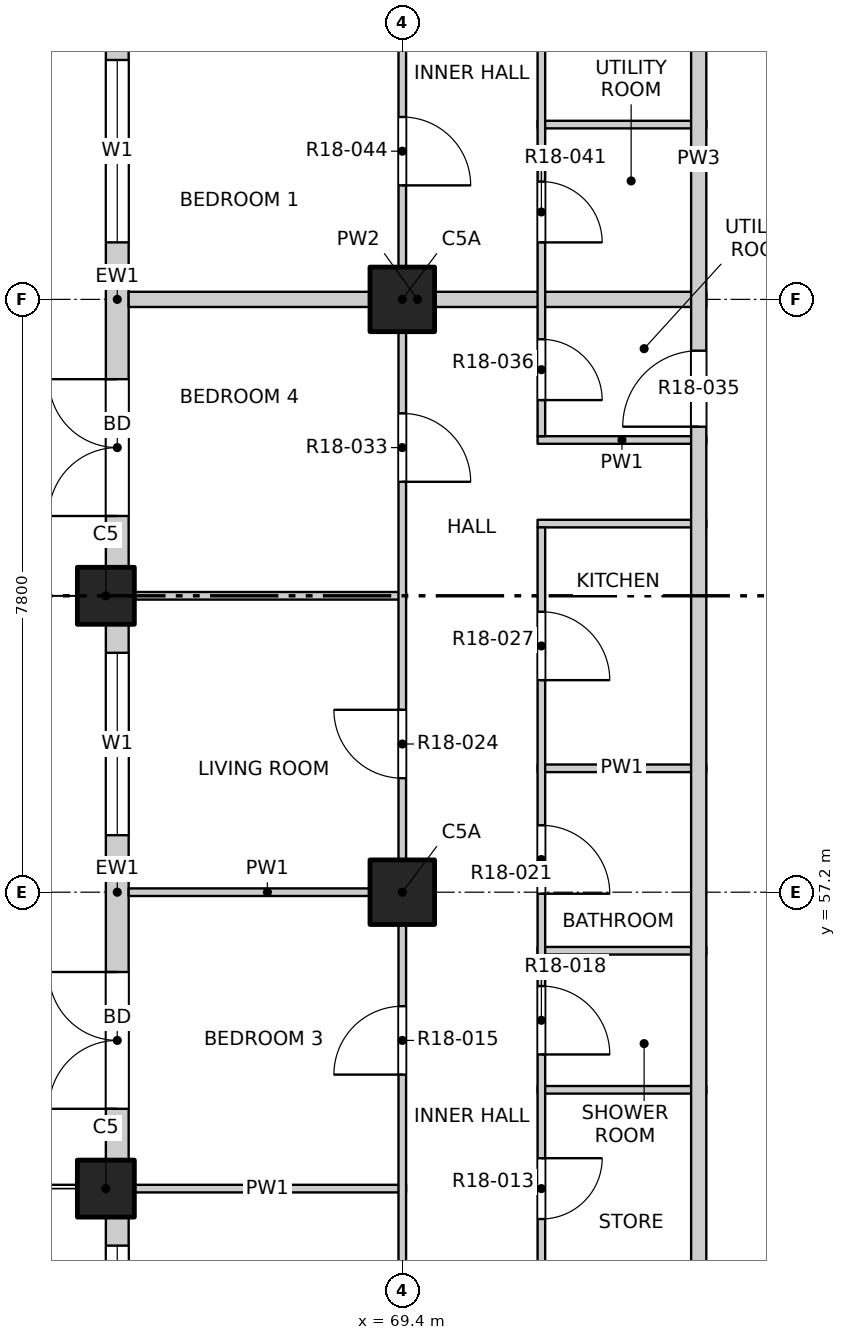
"""IFC4 building model, lengths in metres.
Left out: names, types, materials, properties, quantities, classifications, styles, units other than length and angle.
Written with IfcOpenShell. Run it as: python <this file> out.ifc"""

import sys

from ifc_helpers import new_model, si_unit, direction, frame, frame_2d, origin, origin_2d, place, context, subcontext, project, spatial, rectangle, extrude, element, fill, save


model = new_model("IFC4")
c1 = context("Model", 3, precision=1e-05, world=origin(), true_north=direction((0.0, 1.0)))
c2 = subcontext(c1, "Body", "Model", "MODEL_VIEW")
j1 = project(units=[si_unit("LENGTHUNIT", "METRE"), si_unit("PLANEANGLEUNIT", "RADIAN")], contexts=[c1])
p1 = place(None, origin())
s1 = spatial("IfcSite", under=j1, at=p1, CompositionType="ELEMENT")
p2 = place(p1, origin())
s2 = spatial("IfcBuilding", under=s1, at=p2, CompositionType="ELEMENT")
p3 = place(p2, frame((0.0, 0.0, 189.4)))
s3 = spatial("IfcBuildingStorey", under=s2, at=p3, CompositionType="ELEMENT", Elevation=189.4)
for number, where, z_axis, x_axis in (
    (1, (65.5, 53.3, -0.25), (0.0, 0.0, 1.0), (1.0, 0.0, 0.0)),
    (2, (65.5, 61.1, -0.25), (0.0, 0.0, 1.0), (1.0, 0.0, 0.0)),
):
    element("IfcColumn", number, at=place(p3, frame(where, z_axis=z_axis, x_axis=x_axis)), inside=s3, PredefinedType="COLUMN", context=c2, shape_type="SweptSolid", body=[
        extrude(rectangle(XDim=0.75, YDim=0.75, at=origin_2d()), origin(), (0.0, 0.0, 1.0), 3.35),
    ])
for number, where, z_axis, x_axis in (
    (3, (69.4, 57.2, -0.25), (0.0, 0.0, 1.0), (1.0, 0.0, 0.0)),
    (4, (69.4, 65.0, -0.25), (0.0, 0.0, 1.0), (1.0, 0.0, 0.0)),
):
    element("IfcColumn", number, at=place(p3, frame(where, z_axis=z_axis, x_axis=x_axis)), inside=s3, PredefinedType="COLUMN", context=c2, shape_type="SweptSolid", body=[
        extrude(rectangle(XDim=0.85, YDim=0.85, at=origin_2d()), origin(), (0.0, 0.0, 1.0), 3.35),
    ])
p4 = place(p3, frame((65.65, 49.4, 0.0), z_axis=(0.0, 0.0, 1.0), x_axis=(0.0, 1.0, 0.0)))
e5 = element("IfcWall", 5, at=p4, inside=s3, PredefinedType="SOLIDWALL", context=c2, shape_type="SweptSolid", body=[
    extrude(rectangle(XDim=3.525, YDim=0.3, at=frame_2d((1.763, 0.0))), origin(), (0.0, 0.0, 1.0), 3.1),
])
p5 = place(p4, frame((0.75, 0.0, 0.9)))
e6 = element("IfcOpeningElement", 6, at=p5, cuts=e5, PredefinedType="OPENING", context=c2, shape_type="SweptSolid", body=[
    extrude(rectangle(XDim=2.4, YDim=1.8, at=frame_2d((1.2, 0.9))), frame((0.0, 0.16, 0.0), z_axis=(0.0, -1.0, 0.0), x_axis=(1.0, 0.0, 0.0)), (0.0, 0.0, 1.0), 0.32),
])
p6 = place(p3, frame((65.65, 53.675, 0.0), z_axis=(0.0, 0.0, 1.0), x_axis=(0.0, 1.0, 0.0)))
e7 = element("IfcWall", 7, at=p6, inside=s3, PredefinedType="SOLIDWALL", context=c2, shape_type="SweptSolid", body=[
    extrude(rectangle(XDim=7.05, YDim=0.3, at=frame_2d((3.525, 0.0))), origin(), (0.0, 0.0, 1.0), 3.1),
])
p7 = place(p6, frame((0.675, 0.0, 0.0)))
e8 = element("IfcOpeningElement", 8, at=p7, cuts=e7, PredefinedType="OPENING", context=c2, shape_type="SweptSolid", body=[
    extrude(rectangle(XDim=1.8, YDim=2.4, at=frame_2d((0.9, 1.2))), frame((0.0, 0.16, 0.0), z_axis=(0.0, -1.0, 0.0), x_axis=(1.0, 0.0, 0.0)), (0.0, 0.0, 1.0), 0.32),
])
p8 = place(p6, frame((4.275, 0.0, 0.9)))
e9 = element("IfcOpeningElement", 9, at=p8, cuts=e7, PredefinedType="OPENING", context=c2, shape_type="SweptSolid", body=[
    extrude(rectangle(XDim=2.4, YDim=1.8, at=frame_2d((1.2, 0.9))), frame((0.0, 0.16, 0.0), z_axis=(0.0, -1.0, 0.0), x_axis=(1.0, 0.0, 0.0)), (0.0, 0.0, 1.0), 0.32),
])
p9 = place(p3, frame((65.65, 61.475, 0.0), z_axis=(0.0, 0.0, 1.0), x_axis=(0.0, 1.0, 0.0)))
e10 = element("IfcWall", 10, at=p9, inside=s3, PredefinedType="SOLIDWALL", context=c2, shape_type="SweptSolid", body=[
    extrude(rectangle(XDim=7.05, YDim=0.3, at=frame_2d((3.525, 0.0))), origin(), (0.0, 0.0, 1.0), 3.1),
])
p10 = place(p9, frame((0.675, 0.0, 0.0)))
e11 = element("IfcOpeningElement", 11, at=p10, cuts=e10, PredefinedType="OPENING", context=c2, shape_type="SweptSolid", body=[
    extrude(rectangle(XDim=1.8, YDim=2.4, at=frame_2d((0.9, 1.2))), frame((0.0, 0.16, 0.0), z_axis=(0.0, -1.0, 0.0), x_axis=(1.0, 0.0, 0.0)), (0.0, 0.0, 1.0), 0.32),
])
p11 = place(p9, frame((4.275, 0.0, 0.9)))
e12 = element("IfcOpeningElement", 12, at=p11, cuts=e10, PredefinedType="OPENING", context=c2, shape_type="SweptSolid", body=[
    extrude(rectangle(XDim=2.4, YDim=1.8, at=frame_2d((1.2, 0.9))), frame((0.0, 0.16, 0.0), z_axis=(0.0, -1.0, 0.0), x_axis=(1.0, 0.0, 0.0)), (0.0, 0.0, 1.0), 0.32),
])
p12 = place(p3, frame((65.8, 53.3, 0.0), z_axis=(0.0, 0.0, 1.0), x_axis=(1.0, 0.0, 0.0)))
e13 = element("IfcWall", 13, at=p12, inside=s3, PredefinedType="PARTITIONING", context=c2, shape_type="SweptSolid", body=[
    extrude(rectangle(XDim=3.65, YDim=0.1, at=frame_2d((1.825, 0.0))), origin(), (0.0, 0.0, 1.0), 3.1),
])
for number, where, z_axis, x_axis in (
    (14, (71.18, 54.6, 0.0), (0.0, 0.0, 1.0), (1.0, 0.0, 0.0)),
    (15, (71.18, 56.43, 0.0), (0.0, 0.0, 1.0), (1.0, 0.0, 0.0)),
):
    element("IfcWall", number, at=place(p3, frame(where, z_axis=z_axis, x_axis=x_axis)), inside=s3, PredefinedType="PARTITIONING", context=c2, shape_type="SweptSolid", body=[
        extrude(rectangle(XDim=2.22, YDim=0.1, at=frame_2d((1.11, 0.0))), origin(), (0.0, 0.0, 1.0), 3.1),
    ])
p13 = place(p3, frame((65.8, 57.2, 0.0), z_axis=(0.0, 0.0, 1.0), x_axis=(1.0, 0.0, 0.0)))
e16 = element("IfcWall", 16, at=p13, inside=s3, PredefinedType="PARTITIONING", context=c2, shape_type="SweptSolid", body=[
    extrude(rectangle(XDim=3.65, YDim=0.1, at=frame_2d((1.825, 0.0))), origin(), (0.0, 0.0, 1.0), 3.1),
])
p14 = place(p3, frame((71.18, 58.83, 0.0), z_axis=(0.0, 0.0, 1.0), x_axis=(1.0, 0.0, 0.0)))
e17 = element("IfcWall", 17, at=p14, inside=s3, PredefinedType="PARTITIONING", context=c2, shape_type="SweptSolid", body=[
    extrude(rectangle(XDim=2.22, YDim=0.1, at=frame_2d((1.11, 0.0))), origin(), (0.0, 0.0, 1.0), 3.1),
])
p15 = place(p3, frame((65.8, 61.1, 0.0), z_axis=(0.0, 0.0, 1.0), x_axis=(1.0, 0.0, 0.0)))
e18 = element("IfcWall", 18, at=p15, inside=s3, PredefinedType="PARTITIONING", context=c2, shape_type="SweptSolid", body=[
    extrude(rectangle(XDim=3.65, YDim=0.1, at=frame_2d((1.825, 0.0))), origin(), (0.0, 0.0, 1.0), 3.1),
])
for number, where, z_axis, x_axis in (
    (19, (71.18, 62.05, 0.0), (0.0, 0.0, 1.0), (1.0, 0.0, 0.0)),
    (20, (71.18, 63.15, 0.0), (0.0, 0.0, 1.0), (1.0, 0.0, 0.0)),
):
    element("IfcWall", number, at=place(p3, frame(where, z_axis=z_axis, x_axis=x_axis)), inside=s3, PredefinedType="PARTITIONING", context=c2, shape_type="SweptSolid", body=[
        extrude(rectangle(XDim=2.22, YDim=0.1, at=frame_2d((1.11, 0.0))), origin(), (0.0, 0.0, 1.0), 3.1),
    ])
p16 = place(p3, frame((65.8, 65.0, 0.0), z_axis=(0.0, 0.0, 1.0), x_axis=(1.0, 0.0, 0.0)))
e21 = element("IfcWall", 21, at=p16, inside=s3, PredefinedType="PARTITIONING", context=c2, shape_type="SweptSolid", body=[
    extrude(rectangle(XDim=7.6, YDim=0.2, at=frame_2d((3.8, 0.0))), origin(), (0.0, 0.0, 1.0), 3.1),
])
p17 = place(p3, frame((71.18, 67.3, 0.0), z_axis=(0.0, 0.0, 1.0), x_axis=(1.0, 0.0, 0.0)))
e22 = element("IfcWall", 22, at=p17, inside=s3, PredefinedType="PARTITIONING", context=c2, shape_type="SweptSolid", body=[
    extrude(rectangle(XDim=2.22, YDim=0.1, at=frame_2d((1.11, 0.0))), origin(), (0.0, 0.0, 1.0), 3.1),
])
p18 = place(p3, frame((69.4, 45.8, 0.0), z_axis=(0.0, 0.0, 1.0), x_axis=(0.0, 1.0, 0.0)))
e23 = element("IfcWall", 23, at=p18, inside=s3, PredefinedType="PARTITIONING", context=c2, shape_type="SweptSolid", body=[
    extrude(rectangle(XDim=38.4, YDim=0.1, at=frame_2d((19.2, 0.0))), origin(), (0.0, 0.0, 1.0), 3.1),
])
p19 = place(p18, frame((1.05, 0.0, 0.0)))
e24 = element("IfcOpeningElement", 24, at=p19, cuts=e23, PredefinedType="OPENING", context=c2, shape_type="SweptSolid", body=[
    extrude(rectangle(XDim=1.2, YDim=2.1, at=frame_2d((0.6, 1.05))), frame((0.0, 0.06, 0.0), z_axis=(0.0, -1.0, 0.0), x_axis=(1.0, 0.0, 0.0)), (0.0, 0.0, 1.0), 0.12),
])
p20 = place(p18, frame((5.1, 0.0, 0.0)))
e25 = element("IfcOpeningElement", 25, at=p20, cuts=e23, PredefinedType="OPENING", context=c2, shape_type="SweptSolid", body=[
    extrude(rectangle(XDim=0.9, YDim=2.1, at=frame_2d((0.45, 1.05))), frame((0.0, 0.06, 0.0), z_axis=(0.0, -1.0, 0.0), x_axis=(1.0, 0.0, 0.0)), (0.0, 0.0, 1.0), 0.12),
])
p21 = place(p18, frame((9.0, 0.0, 0.0)))
e26 = element("IfcOpeningElement", 26, at=p21, cuts=e23, PredefinedType="OPENING", context=c2, shape_type="SweptSolid", body=[
    extrude(rectangle(XDim=0.9, YDim=2.1, at=frame_2d((0.45, 1.05))), frame((0.0, 0.06, 0.0), z_axis=(0.0, -1.0, 0.0), x_axis=(1.0, 0.0, 0.0)), (0.0, 0.0, 1.0), 0.12),
])
p22 = place(p18, frame((12.9, 0.0, 0.0)))
e27 = element("IfcOpeningElement", 27, at=p22, cuts=e23, PredefinedType="OPENING", context=c2, shape_type="SweptSolid", body=[
    extrude(rectangle(XDim=0.9, YDim=2.1, at=frame_2d((0.45, 1.05))), frame((0.0, 0.06, 0.0), z_axis=(0.0, -1.0, 0.0), x_axis=(1.0, 0.0, 0.0)), (0.0, 0.0, 1.0), 0.12),
])
p23 = place(p18, frame((16.8, 0.0, 0.0)))
e28 = element("IfcOpeningElement", 28, at=p23, cuts=e23, PredefinedType="OPENING", context=c2, shape_type="SweptSolid", body=[
    extrude(rectangle(XDim=0.9, YDim=2.1, at=frame_2d((0.45, 1.05))), frame((0.0, 0.06, 0.0), z_axis=(0.0, -1.0, 0.0), x_axis=(1.0, 0.0, 0.0)), (0.0, 0.0, 1.0), 0.12),
])
p24 = place(p18, frame((20.7, 0.0, 0.0)))
e29 = element("IfcOpeningElement", 29, at=p24, cuts=e23, PredefinedType="OPENING", context=c2, shape_type="SweptSolid", body=[
    extrude(rectangle(XDim=0.9, YDim=2.1, at=frame_2d((0.45, 1.05))), frame((0.0, 0.06, 0.0), z_axis=(0.0, -1.0, 0.0), x_axis=(1.0, 0.0, 0.0)), (0.0, 0.0, 1.0), 0.12),
])
p25 = place(p18, frame((24.6, 0.0, 0.0)))
e30 = element("IfcOpeningElement", 30, at=p25, cuts=e23, PredefinedType="OPENING", context=c2, shape_type="SweptSolid", body=[
    extrude(rectangle(XDim=0.9, YDim=2.1, at=frame_2d((0.45, 1.05))), frame((0.0, 0.06, 0.0), z_axis=(0.0, -1.0, 0.0), x_axis=(1.0, 0.0, 0.0)), (0.0, 0.0, 1.0), 0.12),
])
p26 = place(p18, frame((28.5, 0.0, 0.0)))
e31 = element("IfcOpeningElement", 31, at=p26, cuts=e23, PredefinedType="OPENING", context=c2, shape_type="SweptSolid", body=[
    extrude(rectangle(XDim=0.9, YDim=2.1, at=frame_2d((0.45, 1.05))), frame((0.0, 0.06, 0.0), z_axis=(0.0, -1.0, 0.0), x_axis=(1.0, 0.0, 0.0)), (0.0, 0.0, 1.0), 0.12),
])
p27 = place(p18, frame((32.4, 0.0, 0.0)))
e32 = element("IfcOpeningElement", 32, at=p27, cuts=e23, PredefinedType="OPENING", context=c2, shape_type="SweptSolid", body=[
    extrude(rectangle(XDim=0.9, YDim=2.1, at=frame_2d((0.45, 1.05))), frame((0.0, 0.06, 0.0), z_axis=(0.0, -1.0, 0.0), x_axis=(1.0, 0.0, 0.0)), (0.0, 0.0, 1.0), 0.12),
])
p28 = place(p18, frame((36.15, 0.0, 0.0)))
e33 = element("IfcOpeningElement", 33, at=p28, cuts=e23, PredefinedType="OPENING", context=c2, shape_type="SweptSolid", body=[
    extrude(rectangle(XDim=1.2, YDim=2.1, at=frame_2d((0.6, 1.05))), frame((0.0, 0.06, 0.0), z_axis=(0.0, -1.0, 0.0), x_axis=(1.0, 0.0, 0.0)), (0.0, 0.0, 1.0), 0.12),
])
p29 = place(p3, frame((71.23, 49.45, 0.0), z_axis=(0.0, 0.0, 1.0), x_axis=(0.0, 1.0, 0.0)))
e34 = element("IfcWall", 34, at=p29, inside=s3, PredefinedType="PARTITIONING", context=c2, shape_type="SweptSolid", body=[
    extrude(rectangle(XDim=12.55, YDim=0.1, at=frame_2d((6.275, 0.0))), origin(), (0.0, 0.0, 1.0), 3.1),
])
p30 = place(p29, frame((0.85, 0.0, 0.0)))
e35 = element("IfcOpeningElement", 35, at=p30, cuts=e34, PredefinedType="OPENING", context=c2, shape_type="SweptSolid", body=[
    extrude(rectangle(XDim=0.8, YDim=2.1, at=frame_2d((0.4, 1.05))), frame((0.0, 0.06, 0.0), z_axis=(0.0, -1.0, 0.0), x_axis=(1.0, 0.0, 0.0)), (0.0, 0.0, 1.0), 0.12),
])
p31 = place(p29, frame((3.45, 0.0, 0.0)))
e36 = element("IfcOpeningElement", 36, at=p31, cuts=e34, PredefinedType="OPENING", context=c2, shape_type="SweptSolid", body=[
    extrude(rectangle(XDim=0.8, YDim=2.1, at=frame_2d((0.4, 1.05))), frame((0.0, 0.06, 0.0), z_axis=(0.0, -1.0, 0.0), x_axis=(1.0, 0.0, 0.0)), (0.0, 0.0, 1.0), 0.12),
])
p32 = place(p29, frame((5.615, 0.0, 0.0)))
e37 = element("IfcOpeningElement", 37, at=p32, cuts=e34, PredefinedType="OPENING", context=c2, shape_type="SweptSolid", body=[
    extrude(rectangle(XDim=0.9, YDim=2.1, at=frame_2d((0.45, 1.05))), frame((0.0, 0.06, 0.0), z_axis=(0.0, -1.0, 0.0), x_axis=(1.0, 0.0, 0.0)), (0.0, 0.0, 1.0), 0.12),
])
p33 = place(p29, frame((7.73, 0.0, 0.0)))
e38 = element("IfcOpeningElement", 38, at=p33, cuts=e34, PredefinedType="OPENING", context=c2, shape_type="SweptSolid", body=[
    extrude(rectangle(XDim=0.9, YDim=2.1, at=frame_2d((0.45, 1.05))), frame((0.0, 0.06, 0.0), z_axis=(0.0, -1.0, 0.0), x_axis=(1.0, 0.0, 0.0)), (0.0, 0.0, 1.0), 0.12),
])
p34 = place(p29, frame((10.54, 0.0, 0.0)))
e39 = element("IfcOpeningElement", 39, at=p34, cuts=e34, PredefinedType="OPENING", context=c2, shape_type="SweptSolid", body=[
    extrude(rectangle(XDim=0.9, YDim=2.1, at=frame_2d((0.45, 1.05))), frame((0.0, 0.06, 0.0), z_axis=(0.0, -1.0, 0.0), x_axis=(1.0, 0.0, 0.0)), (0.0, 0.0, 1.0), 0.12),
])
p35 = place(p3, frame((71.23, 63.2, 0.0), z_axis=(0.0, 0.0, 1.0), x_axis=(0.0, 1.0, 0.0)))
e40 = element("IfcWall", 40, at=p35, inside=s3, PredefinedType="PARTITIONING", context=c2, shape_type="SweptSolid", body=[
    extrude(rectangle(XDim=6.95, YDim=0.1, at=frame_2d((3.475, 0.0))), origin(), (0.0, 0.0, 1.0), 3.1),
])
p36 = place(p35, frame((0.475, 0.0, 0.0)))
e41 = element("IfcOpeningElement", 41, at=p36, cuts=e40, PredefinedType="OPENING", context=c2, shape_type="SweptSolid", body=[
    extrude(rectangle(XDim=0.8, YDim=2.1, at=frame_2d((0.4, 1.05))), frame((0.0, 0.06, 0.0), z_axis=(0.0, -1.0, 0.0), x_axis=(1.0, 0.0, 0.0)), (0.0, 0.0, 1.0), 0.12),
])
p37 = place(p35, frame((2.55, 0.0, 0.0)))
e42 = element("IfcOpeningElement", 42, at=p37, cuts=e40, PredefinedType="OPENING", context=c2, shape_type="SweptSolid", body=[
    extrude(rectangle(XDim=0.8, YDim=2.1, at=frame_2d((0.4, 1.05))), frame((0.0, 0.06, 0.0), z_axis=(0.0, -1.0, 0.0), x_axis=(1.0, 0.0, 0.0)), (0.0, 0.0, 1.0), 0.12),
])
p38 = place(p35, frame((5.15, 0.0, 0.0)))
e43 = element("IfcOpeningElement", 43, at=p38, cuts=e40, PredefinedType="OPENING", context=c2, shape_type="SweptSolid", body=[
    extrude(rectangle(XDim=0.8, YDim=2.1, at=frame_2d((0.4, 1.05))), frame((0.0, 0.06, 0.0), z_axis=(0.0, -1.0, 0.0), x_axis=(1.0, 0.0, 0.0)), (0.0, 0.0, 1.0), 0.12),
])
p39 = place(p3, frame((73.3, 49.5, 0.0), z_axis=(0.0, 0.0, 1.0), x_axis=(0.0, 1.0, 0.0)))
e44 = element("IfcWall", 44, at=p39, inside=s3, PredefinedType="PARTITIONING", context=c2, shape_type="SweptSolid", body=[
    extrude(rectangle(XDim=34.7, YDim=0.2, at=frame_2d((17.35, 0.0))), origin(), (0.0, 0.0, 1.0), 3.1),
])
p40 = place(p39, frame((13.825, 0.0, 0.0)))
e45 = element("IfcOpeningElement", 45, at=p40, cuts=e44, PredefinedType="OPENING", context=c2, shape_type="SweptSolid", body=[
    extrude(rectangle(XDim=1.0, YDim=2.1, at=frame_2d((0.5, 1.05))), frame((0.0, 0.11, 0.0), z_axis=(0.0, -1.0, 0.0), x_axis=(1.0, 0.0, 0.0)), (0.0, 0.0, 1.0), 0.22),
])
p41 = place(p39, frame((21.975, 0.0, 0.0)))
e46 = element("IfcOpeningElement", 46, at=p41, cuts=e44, PredefinedType="OPENING", context=c2, shape_type="SweptSolid", body=[
    extrude(rectangle(XDim=1.0, YDim=2.1, at=frame_2d((0.5, 1.05))), frame((0.0, 0.11, 0.0), z_axis=(0.0, -1.0, 0.0), x_axis=(1.0, 0.0, 0.0)), (0.0, 0.0, 1.0), 0.22),
])
p42 = place(p5, origin())
e47 = element("IfcWindow", 47, at=p42, inside=s3, PartitioningType="DOUBLE_PANEL_VERTICAL", PredefinedType="WINDOW", context=c2, shape_type="SweptSolid", body=[
    extrude(rectangle(XDim=2.4, YDim=1.8, at=frame_2d((1.2, 0.9))), frame((0.0, 0.03, 0.0), z_axis=(0.0, -1.0, 0.0), x_axis=(1.0, 0.0, 0.0)), (0.0, 0.0, 1.0), 0.06),
])
fill(e6, e47)
p43 = place(p7, origin())
e48 = element("IfcDoor", 48, at=p43, inside=s3, OperationType="DOUBLE_DOOR_SINGLE_SWING", PredefinedType="DOOR", context=c2, shape_type="SweptSolid", body=[
    extrude(rectangle(XDim=1.8, YDim=2.4, at=frame_2d((0.9, 1.2))), frame((0.0, 0.025, 0.0), z_axis=(0.0, -1.0, 0.0), x_axis=(1.0, 0.0, 0.0)), (0.0, 0.0, 1.0), 0.05),
])
fill(e8, e48)
p44 = place(p8, origin())
e49 = element("IfcWindow", 49, at=p44, inside=s3, PartitioningType="DOUBLE_PANEL_VERTICAL", PredefinedType="WINDOW", context=c2, shape_type="SweptSolid", body=[
    extrude(rectangle(XDim=2.4, YDim=1.8, at=frame_2d((1.2, 0.9))), frame((0.0, 0.03, 0.0), z_axis=(0.0, -1.0, 0.0), x_axis=(1.0, 0.0, 0.0)), (0.0, 0.0, 1.0), 0.06),
])
fill(e9, e49)
p45 = place(p10, origin())
e50 = element("IfcDoor", 50, at=p45, inside=s3, OperationType="DOUBLE_DOOR_SINGLE_SWING", PredefinedType="DOOR", context=c2, shape_type="SweptSolid", body=[
    extrude(rectangle(XDim=1.8, YDim=2.4, at=frame_2d((0.9, 1.2))), frame((0.0, 0.025, 0.0), z_axis=(0.0, -1.0, 0.0), x_axis=(1.0, 0.0, 0.0)), (0.0, 0.0, 1.0), 0.05),
])
fill(e11, e50)
p46 = place(p11, origin())
e51 = element("IfcWindow", 51, at=p46, inside=s3, PartitioningType="DOUBLE_PANEL_VERTICAL", PredefinedType="WINDOW", context=c2, shape_type="SweptSolid", body=[
    extrude(rectangle(XDim=2.4, YDim=1.8, at=frame_2d((1.2, 0.9))), frame((0.0, 0.03, 0.0), z_axis=(0.0, -1.0, 0.0), x_axis=(1.0, 0.0, 0.0)), (0.0, 0.0, 1.0), 0.06),
])
fill(e12, e51)
p47 = place(p31, origin())
e52 = element("IfcDoor", 52, at=p47, inside=s3, OperationType="SINGLE_SWING_LEFT", PredefinedType="DOOR", context=c2, shape_type="SweptSolid", body=[
    extrude(rectangle(XDim=0.8, YDim=2.1, at=frame_2d((0.4, 1.05))), frame((0.0, 0.025, 0.0), z_axis=(0.0, -1.0, 0.0), x_axis=(1.0, 0.0, 0.0)), (0.0, 0.0, 1.0), 0.05),
])
fill(e36, e52)
p48 = place(p21, origin())
e53 = element("IfcDoor", 53, at=p48, inside=s3, OperationType="SINGLE_SWING_LEFT", PredefinedType="DOOR", context=c2, shape_type="SweptSolid", body=[
    extrude(rectangle(XDim=0.9, YDim=2.1, at=frame_2d((0.45, 1.05))), frame((0.0, 0.025, 0.0), z_axis=(0.0, -1.0, 0.0), x_axis=(1.0, 0.0, 0.0)), (0.0, 0.0, 1.0), 0.05),
])
fill(e26, e53)
p49 = place(p32, origin())
e54 = element("IfcDoor", 54, at=p49, inside=s3, OperationType="SINGLE_SWING_RIGHT", PredefinedType="DOOR", context=c2, shape_type="SweptSolid", body=[
    extrude(rectangle(XDim=0.9, YDim=2.1, at=frame_2d((0.45, 1.05))), frame((0.0, 0.025, 0.0), z_axis=(0.0, -1.0, 0.0), x_axis=(1.0, 0.0, 0.0)), (0.0, 0.0, 1.0), 0.05),
])
fill(e37, e54)
p50 = place(p33, origin())
e55 = element("IfcDoor", 55, at=p50, inside=s3, OperationType="SINGLE_SWING_RIGHT", PredefinedType="DOOR", context=c2, shape_type="SweptSolid", body=[
    extrude(rectangle(XDim=0.9, YDim=2.1, at=frame_2d((0.45, 1.05))), frame((0.0, 0.025, 0.0), z_axis=(0.0, -1.0, 0.0), x_axis=(1.0, 0.0, 0.0)), (0.0, 0.0, 1.0), 0.05),
])
fill(e38, e55)
p51 = place(p22, origin())
e56 = element("IfcDoor", 56, at=p51, inside=s3, OperationType="SINGLE_SWING_RIGHT", PredefinedType="DOOR", context=c2, shape_type="SweptSolid", body=[
    extrude(rectangle(XDim=0.9, YDim=2.1, at=frame_2d((0.45, 1.05))), frame((0.0, 0.025, 0.0), z_axis=(0.0, -1.0, 0.0), x_axis=(1.0, 0.0, 0.0)), (0.0, 0.0, 1.0), 0.05),
])
fill(e27, e56)
p52 = place(p34, origin())
e57 = element("IfcDoor", 57, at=p52, inside=s3, OperationType="SINGLE_SWING_RIGHT", PredefinedType="DOOR", context=c2, shape_type="SweptSolid", body=[
    extrude(rectangle(XDim=0.9, YDim=2.1, at=frame_2d((0.45, 1.05))), frame((0.0, 0.025, 0.0), z_axis=(0.0, -1.0, 0.0), x_axis=(1.0, 0.0, 0.0)), (0.0, 0.0, 1.0), 0.05),
])
fill(e39, e57)
p53 = place(p23, origin())
e58 = element("IfcDoor", 58, at=p53, inside=s3, OperationType="SINGLE_SWING_RIGHT", PredefinedType="DOOR", context=c2, shape_type="SweptSolid", body=[
    extrude(rectangle(XDim=0.9, YDim=2.1, at=frame_2d((0.45, 1.05))), frame((0.0, 0.025, 0.0), z_axis=(0.0, -1.0, 0.0), x_axis=(1.0, 0.0, 0.0)), (0.0, 0.0, 1.0), 0.05),
])
fill(e28, e58)
p54 = place(p40, origin())
e59 = element("IfcDoor", 59, at=p54, inside=s3, OperationType="SINGLE_SWING_RIGHT", PredefinedType="DOOR", context=c2, shape_type="SweptSolid", body=[
    extrude(rectangle(XDim=1.0, YDim=2.1, at=frame_2d((0.5, 1.05))), frame((0.0, 0.025, 0.0), z_axis=(0.0, -1.0, 0.0), x_axis=(1.0, 0.0, 0.0)), (0.0, 0.0, 1.0), 0.05),
])
fill(e45, e59)
p55 = place(p36, origin())
e60 = element("IfcDoor", 60, at=p55, inside=s3, OperationType="SINGLE_SWING_RIGHT", PredefinedType="DOOR", context=c2, shape_type="SweptSolid", body=[
    extrude(rectangle(XDim=0.8, YDim=2.1, at=frame_2d((0.4, 1.05))), frame((0.0, 0.025, 0.0), z_axis=(0.0, -1.0, 0.0), x_axis=(1.0, 0.0, 0.0)), (0.0, 0.0, 1.0), 0.05),
])
fill(e41, e60)
p56 = place(p37, origin())
e61 = element("IfcDoor", 61, at=p56, inside=s3, OperationType="SINGLE_SWING_RIGHT", PredefinedType="DOOR", context=c2, shape_type="SweptSolid", body=[
    extrude(rectangle(XDim=0.8, YDim=2.1, at=frame_2d((0.4, 1.05))), frame((0.0, 0.025, 0.0), z_axis=(0.0, -1.0, 0.0), x_axis=(1.0, 0.0, 0.0)), (0.0, 0.0, 1.0), 0.05),
])
fill(e42, e61)
p57 = place(p24, origin())
e62 = element("IfcDoor", 62, at=p57, inside=s3, OperationType="SINGLE_SWING_RIGHT", PredefinedType="DOOR", context=c2, shape_type="SweptSolid", body=[
    extrude(rectangle(XDim=0.9, YDim=2.1, at=frame_2d((0.45, 1.05))), frame((0.0, 0.025, 0.0), z_axis=(0.0, -1.0, 0.0), x_axis=(1.0, 0.0, 0.0)), (0.0, 0.0, 1.0), 0.05),
])
fill(e29, e62)
save(model, sys.argv[1])
